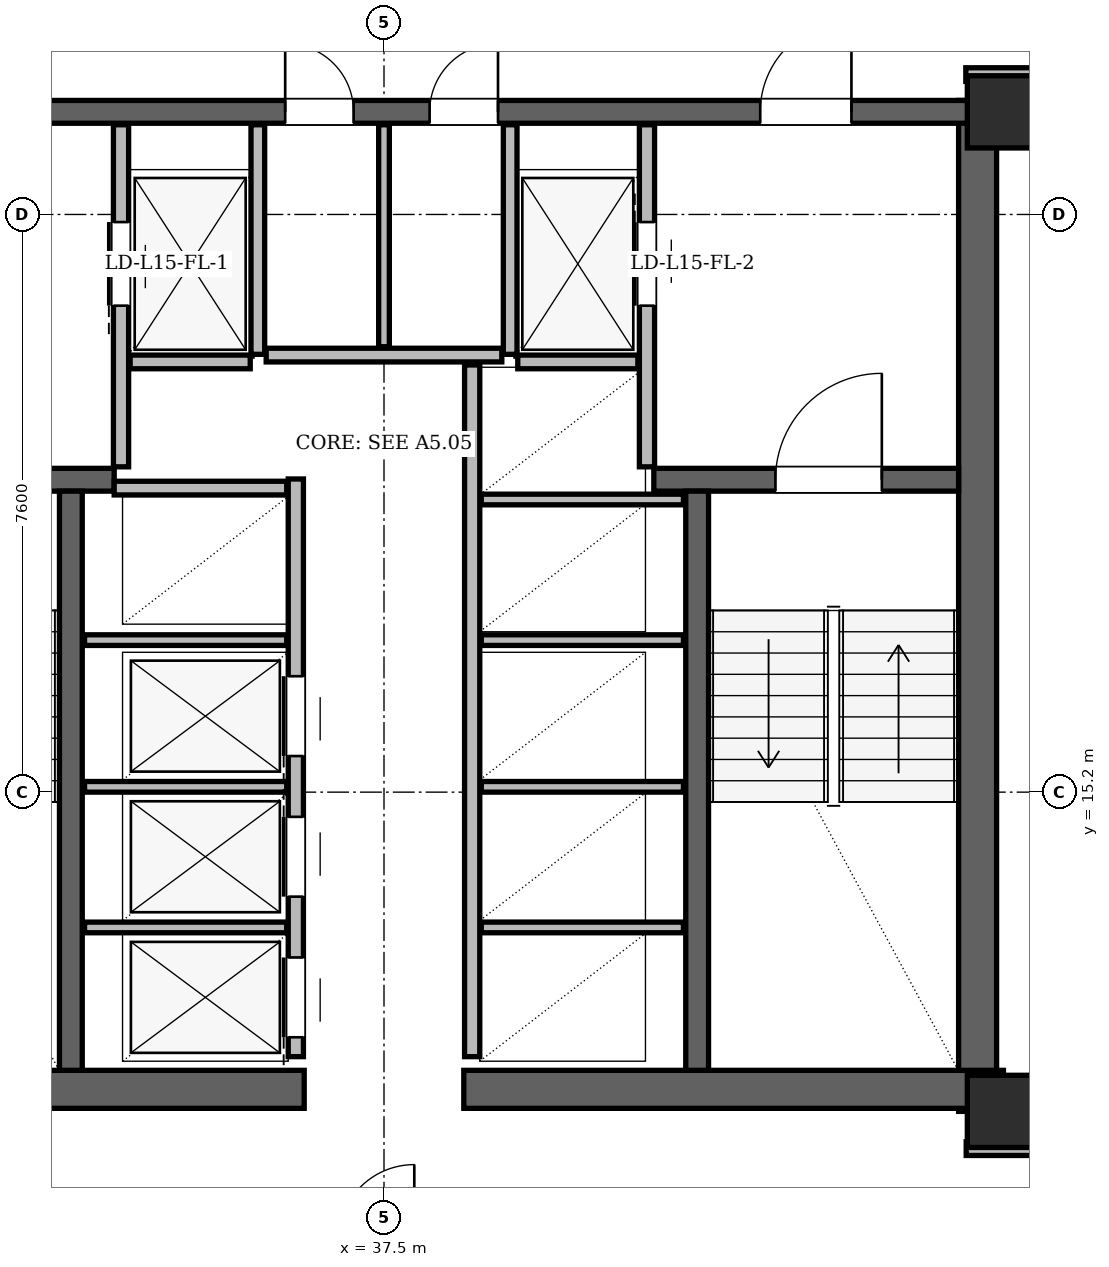
"""IFC4 building model, lengths in metres.
Left out: names, types, materials, properties, quantities, classifications, styles, units other than length and angle.
Written with IfcOpenShell. Run it as: python <this file> out.ifc"""

import sys

from ifc_helpers import new_model, si_unit, direction, frame, frame_2d, origin, origin_2d, place, context, subcontext, project, spatial, rectangle, hollow_rectangle, extrude, element, fill, save


model = new_model("IFC4")
c1 = context("Model", 3, precision=1e-05, world=origin(), true_north=direction((0.0, 1.0)))
c2 = subcontext(c1, "Body", "Model", "MODEL_VIEW")
j1 = project(units=[si_unit("LENGTHUNIT", "METRE"), si_unit("PLANEANGLEUNIT", "RADIAN")], contexts=[c1])
p1 = place(None, origin())
s1 = spatial("IfcSite", under=j1, at=p1, CompositionType="ELEMENT")
p2 = place(p1, origin())
s2 = spatial("IfcBuilding", under=s1, at=p2, CompositionType="ELEMENT")
p3 = place(p2, frame((0.0, 0.0, 59.7)))
s3 = spatial("IfcBuildingStorey", under=s2, at=p3, CompositionType="ELEMENT", Elevation=59.7)
for number, where, z_axis, x_axis in (
    (1, (45.65, 11.0, 0.0), (0.0, 0.0, 1.0), (1.0, 0.0, 0.0)),
    (2, (45.65, 24.15, 0.0), (0.0, 0.0, 1.0), (1.0, 0.0, 0.0)),
):
    element("IfcColumn", number, at=place(p3, frame(where, z_axis=z_axis, x_axis=x_axis)), inside=s3, PredefinedType="COLUMN", context=c2, shape_type="SweptSolid", body=[
        extrude(hollow_rectangle(XDim=0.95, YDim=0.95, WallThickness=0.08, at=origin_2d()), origin(), (0.0, 0.0, 1.0), 3.6),
    ])
p4 = place(p3, frame((45.31, 11.0, 0.0), z_axis=(0.0, 0.0, 1.0), x_axis=(0.0, 1.0, 0.0)))
e3 = element("IfcWall", 3, at=p4, inside=s3, PredefinedType="SHEAR", context=c2, shape_type="SweptSolid", body=[
    extrude(rectangle(XDim=13.3, YDim=0.5, at=frame_2d((6.65, 0.0))), origin(), (0.0, 0.0, 1.0), 3.36),
])
for number, where, z_axis, x_axis in (
    (4, (29.35, 11.29, 0.0), (0.0, 0.0, 1.0), (1.0, 0.0, 0.0)),
    (5, (38.55, 11.29, 0.0), (0.0, 0.0, 1.0), (1.0, 0.0, 0.0)),
):
    element("IfcWall", number, at=place(p3, frame(where, z_axis=z_axis, x_axis=x_axis)), inside=s3, PredefinedType="SHEAR", context=c2, shape_type="SweptSolid", body=[
        extrude(rectangle(XDim=7.1, YDim=0.5, at=frame_2d((3.55, 0.0))), origin(), (0.0, 0.0, 1.0), 3.36),
    ])
p5 = place(p3, frame((29.65, 24.15, 0.0), z_axis=(0.0, 0.0, 1.0), x_axis=(1.0, 0.0, 0.0)))
e6 = element("IfcWall", 6, at=p5, inside=s3, PredefinedType="SHEAR", context=c2, shape_type="SweptSolid", body=[
    extrude(rectangle(XDim=15.7, YDim=0.3, at=frame_2d((7.85, 0.0))), origin(), (0.0, 0.0, 1.0), 3.36),
])
p6 = place(p5, frame((1.7, 0.0, 0.0)))
e7 = element("IfcOpeningElement", 7, at=p6, cuts=e6, PredefinedType="OPENING", context=c2, shape_type="SweptSolid", body=[
    extrude(rectangle(XDim=1.2, YDim=2.2, at=frame_2d((0.6, 1.1))), frame((0.0, 0.15, 0.0), z_axis=(0.0, -1.0, 0.0), x_axis=(1.0, 0.0, 0.0)), (0.0, 0.0, 1.0), 0.3),
])
p7 = place(p5, frame((12.8, 0.0, 0.0)))
e8 = element("IfcOpeningElement", 8, at=p7, cuts=e6, PredefinedType="OPENING", context=c2, shape_type="SweptSolid", body=[
    extrude(rectangle(XDim=1.2, YDim=2.2, at=frame_2d((0.6, 1.1))), frame((0.0, 0.15, 0.0), z_axis=(0.0, -1.0, 0.0), x_axis=(1.0, 0.0, 0.0)), (0.0, 0.0, 1.0), 0.3),
])
p8 = place(p5, frame((6.55, 0.0, 0.0)))
e9 = element("IfcOpeningElement", 9, at=p8, cuts=e6, PredefinedType="OPENING", context=c2, shape_type="SweptSolid", body=[
    extrude(rectangle(XDim=0.9, YDim=2.05, at=frame_2d((0.45, 1.025))), frame((0.0, 0.15, 0.0), z_axis=(0.0, -1.0, 0.0), x_axis=(1.0, 0.0, 0.0)), (0.0, 0.0, 1.0), 0.3),
])
p9 = place(p5, frame((8.45, 0.0, 0.0)))
e10 = element("IfcOpeningElement", 10, at=p9, cuts=e6, PredefinedType="OPENING", context=c2, shape_type="SweptSolid", body=[
    extrude(rectangle(XDim=0.9, YDim=2.05, at=frame_2d((0.45, 1.025))), frame((0.0, 0.15, 0.0), z_axis=(0.0, -1.0, 0.0), x_axis=(1.0, 0.0, 0.0)), (0.0, 0.0, 1.0), 0.3),
])
p10 = place(p3, frame((29.94, 19.31, 0.0), z_axis=(0.0, 0.0, 1.0), x_axis=(1.0, 0.0, 0.0)))
e11 = element("IfcWall", 11, at=p10, inside=s3, PredefinedType="SHEAR", context=c2, shape_type="SweptSolid", body=[
    extrude(rectangle(XDim=4.01, YDim=0.3, at=frame_2d((2.005, 0.0))), origin(), (0.0, 0.0, 1.0), 3.36),
])
p11 = place(p10, frame((1.01, 0.0, 0.0)))
e12 = element("IfcOpeningElement", 12, at=p11, cuts=e11, PredefinedType="OPENING", context=c2, shape_type="SweptSolid", body=[
    extrude(rectangle(XDim=1.4, YDim=2.2, at=frame_2d((0.7, 1.1))), frame((0.0, 0.15, 0.0), z_axis=(0.0, -1.0, 0.0), x_axis=(1.0, 0.0, 0.0)), (0.0, 0.0, 1.0), 0.3),
])
p12 = place(p3, frame((41.05, 19.31, 0.0), z_axis=(0.0, 0.0, 1.0), x_axis=(1.0, 0.0, 0.0)))
e13 = element("IfcWall", 13, at=p12, inside=s3, PredefinedType="SHEAR", context=c2, shape_type="SweptSolid", body=[
    extrude(rectangle(XDim=4.01, YDim=0.3, at=frame_2d((2.005, 0.0))), origin(), (0.0, 0.0, 1.0), 3.36),
])
p13 = place(p12, frame((1.6, 0.0, 0.0)))
e14 = element("IfcOpeningElement", 14, at=p13, cuts=e13, PredefinedType="OPENING", context=c2, shape_type="SweptSolid", body=[
    extrude(rectangle(XDim=1.4, YDim=2.2, at=frame_2d((0.7, 1.1))), frame((0.0, 0.15, 0.0), z_axis=(0.0, -1.0, 0.0), x_axis=(1.0, 0.0, 0.0)), (0.0, 0.0, 1.0), 0.3),
])
for number, where, z_axis, x_axis in (
    (15, (33.38, 11.54, 0.0), (0.0, 0.0, 1.0), (0.0, 1.0, 0.0)),
    (16, (41.62, 11.54, 0.0), (0.0, 0.0, 1.0), (0.0, 1.0, 0.0)),
):
    element("IfcWall", number, at=place(p3, frame(where, z_axis=z_axis, x_axis=x_axis)), inside=s3, PredefinedType="SHEAR", context=c2, shape_type="SweptSolid", body=[
        extrude(rectangle(XDim=7.62, YDim=0.3, at=frame_2d((3.81, 0.0))), origin(), (0.0, 0.0, 1.0), 3.36),
    ])
p14 = place(p3, frame((61.334, 14.47, 0.0), z_axis=(0.0, 0.0, 1.0), x_axis=(-0.499999743921, 0.866025551632, 0.0)))
e17 = element("IfcWall", 17, at=p14, inside=s3, PredefinedType="SOLIDWALL", context=c2, shape_type="SweptSolid", body=[
    extrude(rectangle(XDim=33.585, YDim=0.34, at=frame_2d((16.792, 0.0))), origin(), (0.0, 0.0, 1.0), 2.494),
])
p15 = place(p14, frame((7.615, 0.0, 0.0)))
e18 = element("IfcOpeningElement", 18, at=p15, cuts=e17, PredefinedType="OPENING", context=c2, shape_type="SweptSolid", body=[
    extrude(rectangle(XDim=1.5, YDim=2.2, at=frame_2d((0.75, 1.1))), frame((0.0, 0.17, 0.0), z_axis=(0.0, -1.0, 0.0), x_axis=(1.0, 0.0, 0.0)), (0.0, 0.0, 1.0), 0.34),
])
p16 = place(p14, frame((25.926, 0.0, 0.0)))
e19 = element("IfcOpeningElement", 19, at=p16, cuts=e17, PredefinedType="OPENING", context=c2, shape_type="SweptSolid", body=[
    extrude(rectangle(XDim=1.5, YDim=2.2, at=frame_2d((0.75, 1.1))), frame((0.0, 0.17, 0.0), z_axis=(0.0, -1.0, 0.0), x_axis=(1.0, 0.0, 0.0)), (0.0, 0.0, 1.0), 0.34),
])
p17 = place(p14, frame((1.544, 0.0, 0.85)))
e20 = element("IfcOpeningElement", 20, at=p17, cuts=e17, PredefinedType="OPENING", context=c2, shape_type="SweptSolid", body=[
    extrude(rectangle(XDim=1.4, YDim=1.534, at=frame_2d((0.7, 0.767))), frame((0.0, 0.17, 0.0), z_axis=(0.0, -1.0, 0.0), x_axis=(1.0, 0.0, 0.0)), (0.0, 0.0, 1.0), 0.34),
])
p18 = place(p14, frame((20.338, 0.0, 0.85)))
e21 = element("IfcOpeningElement", 21, at=p18, cuts=e17, PredefinedType="OPENING", context=c2, shape_type="SweptSolid", body=[
    extrude(rectangle(XDim=1.2, YDim=1.48, at=frame_2d((0.6, 0.74))), frame((0.0, 0.17, 0.0), z_axis=(0.0, -1.0, 0.0), x_axis=(1.0, 0.0, 0.0)), (0.0, 0.0, 1.0), 0.34),
])
p19 = place(p14, frame((29.519, 0.0, 0.85)))
e22 = element("IfcOpeningElement", 22, at=p19, cuts=e17, PredefinedType="OPENING", context=c2, shape_type="SweptSolid", body=[
    extrude(rectangle(XDim=2.2, YDim=1.534, at=frame_2d((1.1, 0.767))), frame((0.0, 0.17, 0.0), z_axis=(0.0, -1.0, 0.0), x_axis=(1.0, 0.0, 0.0)), (0.0, 0.0, 1.0), 0.34),
])
p20 = place(p14, frame((14.912, 0.0, 0.85)))
e23 = element("IfcOpeningElement", 23, at=p20, cuts=e17, PredefinedType="OPENING", context=c2, shape_type="SweptSolid", body=[
    extrude(rectangle(XDim=1.2, YDim=1.48, at=frame_2d((0.6, 0.74))), frame((0.0, 0.17, 0.0), z_axis=(0.0, -1.0, 0.0), x_axis=(1.0, 0.0, 0.0)), (0.0, 0.0, 1.0), 0.34),
])
p21 = place(p14, frame((17.664, 0.0, 0.85)))
e24 = element("IfcOpeningElement", 24, at=p21, cuts=e17, PredefinedType="OPENING", context=c2, shape_type="SweptSolid", body=[
    extrude(rectangle(XDim=1.2, YDim=1.48, at=frame_2d((0.6, 0.74))), frame((0.0, 0.17, 0.0), z_axis=(0.0, -1.0, 0.0), x_axis=(1.0, 0.0, 0.0)), (0.0, 0.0, 1.0), 0.34),
])
p22 = place(p3, frame((34.04, 19.48, 0.0), z_axis=(0.0, 0.0, 1.0), x_axis=(0.0, 1.0, 0.0)))
e25 = element("IfcWall", 25, at=p22, inside=s3, PredefinedType="PARTITIONING", context=c2, shape_type="SweptSolid", body=[
    extrude(rectangle(XDim=4.5, YDim=0.2, at=frame_2d((2.25, 0.0))), origin(), (0.0, 0.0, 1.0), 2.4),
])
p23 = place(p22, frame((2.12, 0.0, 0.0)))
e26 = element("IfcOpeningElement", 26, at=p23, cuts=e25, PredefinedType="OPENING", context=c2, shape_type="SweptSolid", body=[
    extrude(rectangle(XDim=1.1, YDim=2.2, at=frame_2d((0.55, 1.1))), frame((0.0, 0.1, 0.0), z_axis=(0.0, -1.0, 0.0), x_axis=(1.0, 0.0, 0.0)), (0.0, 0.0, 1.0), 0.2),
])
p24 = place(p3, frame((35.84, 20.96, 0.0), z_axis=(0.0, 0.0, 1.0), x_axis=(0.0, 1.0, 0.0)))
e27 = element("IfcWall", 27, at=p24, inside=s3, PredefinedType="PARTITIONING", context=c2, shape_type="SweptSolid", body=[
    extrude(rectangle(XDim=3.02, YDim=0.18, at=frame_2d((1.51, 0.0))), origin(), (0.0, 0.0, 1.0), 2.4),
])
p25 = place(p3, frame((34.16, 20.86, 0.0), z_axis=(0.0, 0.0, 1.0), x_axis=(1.0, 0.0, 0.0)))
e28 = element("IfcWall", 28, at=p25, inside=s3, PredefinedType="PARTITIONING", context=c2, shape_type="SweptSolid", body=[
    extrude(rectangle(XDim=1.58, YDim=0.18, at=frame_2d((0.79, 0.0))), origin(), (0.0, 0.0, 1.0), 3.36),
])
p26 = place(p3, frame((40.96, 19.48, 0.0), z_axis=(0.0, 0.0, 1.0), x_axis=(0.0, 1.0, 0.0)))
e29 = element("IfcWall", 29, at=p26, inside=s3, PredefinedType="PARTITIONING", context=c2, shape_type="SweptSolid", body=[
    extrude(rectangle(XDim=4.5, YDim=0.2, at=frame_2d((2.25, 0.0))), origin(), (0.0, 0.0, 1.0), 2.4),
])
p27 = place(p26, frame((2.12, 0.0, 0.0)))
e30 = element("IfcOpeningElement", 30, at=p27, cuts=e29, PredefinedType="OPENING", context=c2, shape_type="SweptSolid", body=[
    extrude(rectangle(XDim=1.1, YDim=2.2, at=frame_2d((0.55, 1.1))), frame((0.0, 0.1, 0.0), z_axis=(0.0, -1.0, 0.0), x_axis=(1.0, 0.0, 0.0)), (0.0, 0.0, 1.0), 0.2),
])
p28 = place(p3, frame((39.16, 20.96, 0.0), z_axis=(0.0, 0.0, 1.0), x_axis=(0.0, 1.0, 0.0)))
e31 = element("IfcWall", 31, at=p28, inside=s3, PredefinedType="PARTITIONING", context=c2, shape_type="SweptSolid", body=[
    extrude(rectangle(XDim=3.02, YDim=0.18, at=frame_2d((1.51, 0.0))), origin(), (0.0, 0.0, 1.0), 2.4),
])
p29 = place(p3, frame((39.26, 20.86, 0.0), z_axis=(0.0, 0.0, 1.0), x_axis=(1.0, 0.0, 0.0)))
e32 = element("IfcWall", 32, at=p29, inside=s3, PredefinedType="PARTITIONING", context=c2, shape_type="SweptSolid", body=[
    extrude(rectangle(XDim=1.58, YDim=0.18, at=frame_2d((0.79, 0.0))), origin(), (0.0, 0.0, 1.0), 3.36),
])
p30 = place(p3, frame((36.34, 11.72, 0.0), z_axis=(0.0, 0.0, 1.0), x_axis=(0.0, 1.0, 0.0)))
e33 = element("IfcWall", 33, at=p30, inside=s3, PredefinedType="PARTITIONING", context=c2, shape_type="SweptSolid", body=[
    extrude(rectangle(XDim=7.6, YDim=0.2, at=frame_2d((3.8, 0.0))), origin(), (0.0, 0.0, 1.0), 3.36),
])
p31 = place(p30, frame((0.255, 0.0, 0.0)))
e34 = element("IfcOpeningElement", 34, at=p31, cuts=e33, PredefinedType="OPENING", context=c2, shape_type="SweptSolid", body=[
    extrude(rectangle(XDim=1.05, YDim=2.15, at=frame_2d((0.525, 1.075))), frame((0.0, 0.1, 0.0), z_axis=(0.0, -1.0, 0.0), x_axis=(1.0, 0.0, 0.0)), (0.0, 0.0, 1.0), 0.2),
])
p32 = place(p30, frame((2.105, 0.0, 0.0)))
e35 = element("IfcOpeningElement", 35, at=p32, cuts=e33, PredefinedType="OPENING", context=c2, shape_type="SweptSolid", body=[
    extrude(rectangle(XDim=1.05, YDim=2.15, at=frame_2d((0.525, 1.075))), frame((0.0, 0.1, 0.0), z_axis=(0.0, -1.0, 0.0), x_axis=(1.0, 0.0, 0.0)), (0.0, 0.0, 1.0), 0.2),
])
p33 = place(p30, frame((3.955, 0.0, 0.0)))
e36 = element("IfcOpeningElement", 36, at=p33, cuts=e33, PredefinedType="OPENING", context=c2, shape_type="SweptSolid", body=[
    extrude(rectangle(XDim=1.05, YDim=2.15, at=frame_2d((0.525, 1.075))), frame((0.0, 0.1, 0.0), z_axis=(0.0, -1.0, 0.0), x_axis=(1.0, 0.0, 0.0)), (0.0, 0.0, 1.0), 0.2),
])
p34 = place(p3, frame((33.95, 19.2, 0.0), z_axis=(0.0, 0.0, 1.0), x_axis=(1.0, 0.0, 0.0)))
e37 = element("IfcWall", 37, at=p34, inside=s3, PredefinedType="PARTITIONING", context=c2, shape_type="SweptSolid", body=[
    extrude(rectangle(XDim=2.27, YDim=0.18, at=frame_2d((1.135, 0.0))), origin(), (0.0, 0.0, 1.0), 3.36),
])
for number, where, z_axis, x_axis in (
    (38, (33.56, 13.42, 0.0), (0.0, 0.0, 1.0), (1.0, 0.0, 0.0)),
    (39, (33.56, 15.27, 0.0), (0.0, 0.0, 1.0), (1.0, 0.0, 0.0)),
    (40, (33.56, 17.2, 0.0), (0.0, 0.0, 1.0), (1.0, 0.0, 0.0)),
):
    element("IfcWall", number, at=place(p3, frame(where, z_axis=z_axis, x_axis=x_axis)), inside=s3, PredefinedType="PARTITIONING", context=c2, shape_type="SweptSolid", body=[
        extrude(rectangle(XDim=2.66, YDim=0.14, at=frame_2d((1.33, 0.0))), origin(), (0.0, 0.0, 1.0), 3.36),
    ])
p35 = place(p3, frame((38.66, 11.72, 0.0), z_axis=(0.0, 0.0, 1.0), x_axis=(0.0, 1.0, 0.0)))
e41 = element("IfcWall", 41, at=p35, inside=s3, PredefinedType="PARTITIONING", context=c2, shape_type="SweptSolid", body=[
    extrude(rectangle(XDim=9.1, YDim=0.2, at=frame_2d((4.55, 0.0))), origin(), (0.0, 0.0, 1.0), 3.36),
])
for number, where, z_axis, x_axis in (
    (42, (38.78, 13.42, 0.0), (0.0, 0.0, 1.0), (1.0, 0.0, 0.0)),
    (43, (38.78, 15.27, 0.0), (0.0, 0.0, 1.0), (1.0, 0.0, 0.0)),
    (44, (38.78, 17.2, 0.0), (0.0, 0.0, 1.0), (1.0, 0.0, 0.0)),
    (45, (38.78, 19.05, 0.0), (0.0, 0.0, 1.0), (1.0, 0.0, 0.0)),
):
    element("IfcWall", number, at=place(p3, frame(where, z_axis=z_axis, x_axis=x_axis)), inside=s3, PredefinedType="PARTITIONING", context=c2, shape_type="SweptSolid", body=[
        extrude(rectangle(XDim=2.66, YDim=0.14, at=frame_2d((1.33, 0.0))), origin(), (0.0, 0.0, 1.0), 3.36),
    ])
p36 = place(p3, frame((35.95, 20.95, 0.0), z_axis=(0.0, 0.0, 1.0), x_axis=(1.0, 0.0, 0.0)))
e46 = element("IfcWall", 46, at=p36, inside=s3, PredefinedType="PARTITIONING", context=c2, shape_type="SweptSolid", body=[
    extrude(rectangle(XDim=3.1, YDim=0.18, at=frame_2d((1.55, 0.0))), origin(), (0.0, 0.0, 1.0), 3.36),
])
p37 = place(p3, frame((37.5, 21.06, 0.0), z_axis=(0.0, 0.0, 1.0), x_axis=(0.0, 1.0, 0.0)))
e47 = element("IfcWall", 47, at=p37, inside=s3, PredefinedType="PARTITIONING", context=c2, shape_type="SweptSolid", body=[
    extrude(rectangle(XDim=2.92, YDim=0.14, at=frame_2d((1.46, 0.0))), origin(), (0.0, 0.0, 1.0), 2.4),
])
p38 = place(p3, frame((45.16, 10.51, 0.0), z_axis=(0.0, 0.0, 1.0), x_axis=(1.0, 0.0, 0.0)))
e48 = element("IfcWall", 48, at=p38, inside=s3, PredefinedType="PARTITIONING", context=c2, shape_type="SweptSolid", body=[
    extrude(rectangle(XDim=0.98, YDim=0.18, at=frame_2d((0.49, 0.0))), origin(), (0.0, 0.0, 1.0), 2.738),
])
p39 = place(p3, frame((45.155, 24.64, 0.0), z_axis=(0.0, 0.0, 1.0), x_axis=(1.0, 0.0, 0.0)))
e49 = element("IfcWall", 49, at=p39, inside=s3, PredefinedType="PARTITIONING", context=c2, shape_type="SweptSolid", body=[
    extrude(rectangle(XDim=0.99, YDim=0.18, at=frame_2d((0.495, 0.0))), origin(), (0.0, 0.0, 1.0), 2.738),
])
p40 = place(p23, origin())
e50 = element("IfcDoor", 50, at=p40, inside=s3, OperationType="SLIDING_TO_LEFT", PredefinedType="DOOR", context=c2, shape_type="SweptSolid", body=[
    extrude(rectangle(XDim=1.1, YDim=2.2, at=frame_2d((0.55, 1.1))), frame((0.0, 0.025, 0.0), z_axis=(0.0, -1.0, 0.0), x_axis=(1.0, 0.0, 0.0)), (0.0, 0.0, 1.0), 0.05),
])
fill(e26, e50)
p41 = place(p27, origin())
e51 = element("IfcDoor", 51, at=p41, inside=s3, OperationType="SLIDING_TO_RIGHT", PredefinedType="DOOR", context=c2, shape_type="SweptSolid", body=[
    extrude(rectangle(XDim=1.1, YDim=2.2, at=frame_2d((0.55, 1.1))), frame((0.0, 0.025, 0.0), z_axis=(0.0, -1.0, 0.0), x_axis=(1.0, 0.0, 0.0)), (0.0, 0.0, 1.0), 0.05),
])
fill(e30, e51)
p42 = place(p31, origin())
e52 = element("IfcDoor", 52, at=p42, inside=s3, OperationType="SLIDING_TO_LEFT", PredefinedType="DOOR", context=c2, shape_type="SweptSolid", body=[
    extrude(rectangle(XDim=1.05, YDim=2.15, at=frame_2d((0.525, 1.075))), frame((0.0, 0.025, 0.0), z_axis=(0.0, -1.0, 0.0), x_axis=(1.0, 0.0, 0.0)), (0.0, 0.0, 1.0), 0.05),
])
fill(e34, e52)
p43 = place(p32, origin())
e53 = element("IfcDoor", 53, at=p43, inside=s3, OperationType="SLIDING_TO_RIGHT", PredefinedType="DOOR", context=c2, shape_type="SweptSolid", body=[
    extrude(rectangle(XDim=1.05, YDim=2.15, at=frame_2d((0.525, 1.075))), frame((0.0, 0.025, 0.0), z_axis=(0.0, -1.0, 0.0), x_axis=(1.0, 0.0, 0.0)), (0.0, 0.0, 1.0), 0.05),
])
fill(e35, e53)
p44 = place(p33, origin())
e54 = element("IfcDoor", 54, at=p44, inside=s3, OperationType="SLIDING_TO_LEFT", PredefinedType="DOOR", context=c2, shape_type="SweptSolid", body=[
    extrude(rectangle(XDim=1.05, YDim=2.15, at=frame_2d((0.525, 1.075))), frame((0.0, 0.025, 0.0), z_axis=(0.0, -1.0, 0.0), x_axis=(1.0, 0.0, 0.0)), (0.0, 0.0, 1.0), 0.05),
])
fill(e36, e54)
p45 = place(p13, origin())
e55 = element("IfcDoor", 55, at=p45, inside=s3, OperationType="SINGLE_SWING_RIGHT", PredefinedType="DOOR", context=c2, shape_type="SweptSolid", body=[
    extrude(rectangle(XDim=1.4, YDim=2.2, at=frame_2d((0.7, 1.1))), frame((0.0, 0.025, 0.0), z_axis=(0.0, -1.0, 0.0), x_axis=(1.0, 0.0, 0.0)), (0.0, 0.0, 1.0), 0.05),
])
fill(e14, e55)
p46 = place(p7, origin())
e56 = element("IfcDoor", 56, at=p46, inside=s3, OperationType="SINGLE_SWING_RIGHT", PredefinedType="DOOR", context=c2, shape_type="SweptSolid", body=[
    extrude(rectangle(XDim=1.2, YDim=2.2, at=frame_2d((0.6, 1.1))), frame((0.0, 0.025, 0.0), z_axis=(0.0, -1.0, 0.0), x_axis=(1.0, 0.0, 0.0)), (0.0, 0.0, 1.0), 0.05),
])
fill(e8, e56)
p47 = place(p8, origin())
e57 = element("IfcDoor", 57, at=p47, inside=s3, OperationType="SINGLE_SWING_LEFT", PredefinedType="DOOR", context=c2, shape_type="SweptSolid", body=[
    extrude(rectangle(XDim=0.9, YDim=2.05, at=frame_2d((0.45, 1.025))), frame((0.0, 0.025, 0.0), z_axis=(0.0, -1.0, 0.0), x_axis=(1.0, 0.0, 0.0)), (0.0, 0.0, 1.0), 0.05),
])
fill(e9, e57)
p48 = place(p9, origin())
e58 = element("IfcDoor", 58, at=p48, inside=s3, OperationType="SINGLE_SWING_RIGHT", PredefinedType="DOOR", context=c2, shape_type="SweptSolid", body=[
    extrude(rectangle(XDim=0.9, YDim=2.05, at=frame_2d((0.45, 1.025))), frame((0.0, 0.025, 0.0), z_axis=(0.0, -1.0, 0.0), x_axis=(1.0, 0.0, 0.0)), (0.0, 0.0, 1.0), 0.05),
])
fill(e10, e58)
save(model, sys.argv[1])
